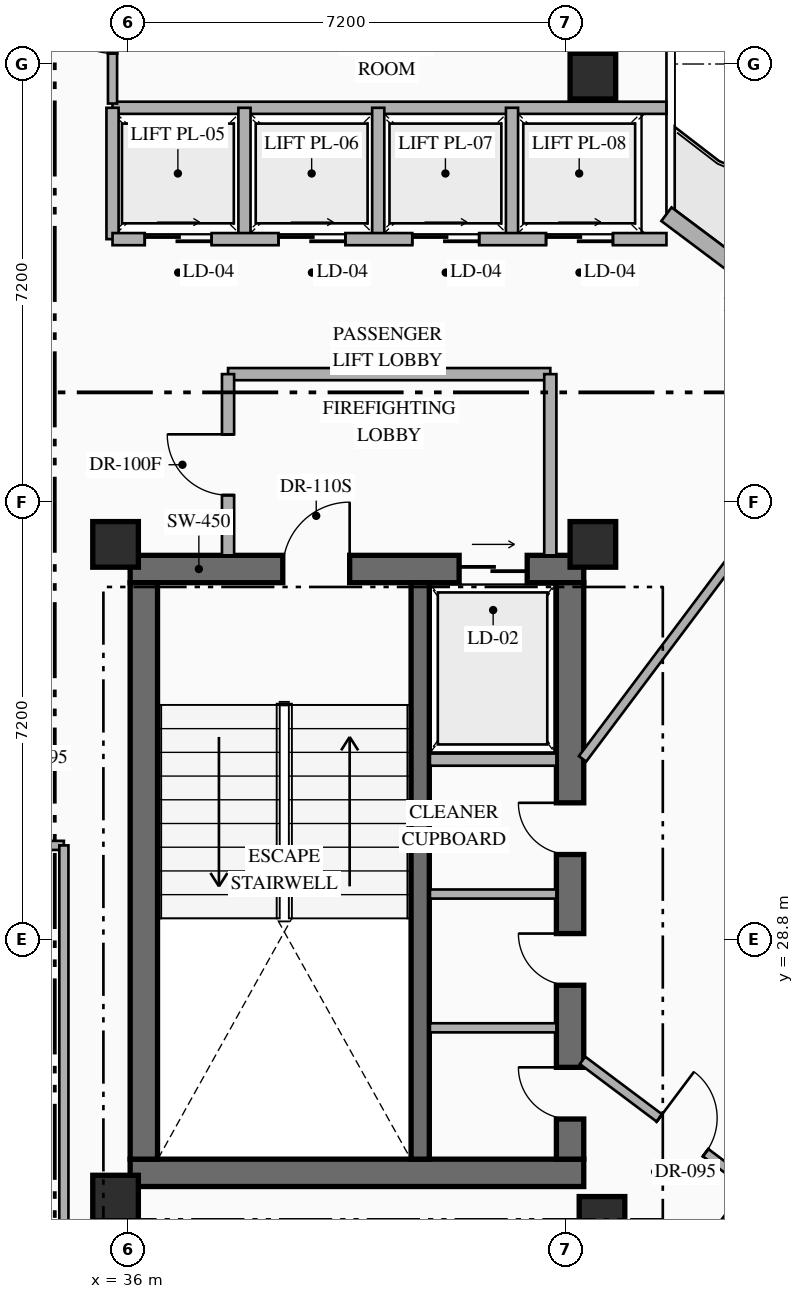
"""IFC4 building model, lengths in metres.
Left out: names, types, materials, properties, quantities, classifications, styles, units other than length and angle.
Written with IfcOpenShell. Run it as: python <this file> out.ifc"""

import sys

from ifc_helpers import new_model, si_unit, direction, frame, frame_2d, origin, origin_2d, place, context, subcontext, project, spatial, rectangle, hollow_rectangle, extrude, element, fill, save


model = new_model("IFC4")
c1 = context("Model", 3, precision=1e-05, world=origin(), true_north=direction((0.0, 1.0)))
c2 = subcontext(c1, "Body", "Model", "MODEL_VIEW")
j1 = project(units=[si_unit("LENGTHUNIT", "METRE"), si_unit("PLANEANGLEUNIT", "RADIAN")], contexts=[c1])
p1 = place(None, origin())
s1 = spatial("IfcSite", under=j1, at=p1, CompositionType="ELEMENT")
p2 = place(p1, origin())
s2 = spatial("IfcBuilding", under=s1, at=p2, CompositionType="ELEMENT")
p3 = place(p2, frame((0.0, 0.0, 195.15)))
s3 = spatial("IfcBuildingStorey", under=s2, at=p3, CompositionType="ELEMENT", Elevation=195.15)
p4 = place(p3, frame((36.04, 24.965, 0.0), z_axis=(0.0, 0.0, 1.0), x_axis=(1.0, 0.0, 0.0)))
e1 = element("IfcWall", 1, at=p4, inside=s3, PredefinedType="SHEAR", context=c2, shape_type="SweptSolid", body=[
    extrude(rectangle(XDim=7.46, YDim=0.45, at=frame_2d((3.73, 0.0))), origin(), (0.0, 0.0, 1.0), 3.6),
])
p5 = place(p3, frame((36.04, 34.895, 0.0), z_axis=(0.0, 0.0, 1.0), x_axis=(1.0, 0.0, 0.0)))
e2 = element("IfcWall", 2, at=p5, inside=s3, PredefinedType="SHEAR", context=c2, shape_type="SweptSolid", body=[
    extrude(rectangle(XDim=7.46, YDim=0.45, at=frame_2d((3.73, 0.0))), origin(), (0.0, 0.0, 1.0), 3.6),
])
p6 = place(p5, frame((2.51, 0.0, 0.0)))
e3 = element("IfcOpeningElement", 3, at=p6, cuts=e2, PredefinedType="OPENING", context=c2, shape_type="SweptSolid", body=[
    extrude(rectangle(XDim=1.1, YDim=2.2, at=frame_2d((0.55, 1.1))), frame((0.0, 0.235, 0.0), z_axis=(0.0, -1.0, 0.0), x_axis=(1.0, 0.0, 0.0)), (0.0, 0.0, 1.0), 0.47),
])
p7 = place(p5, frame((5.41, 0.0, 0.0)))
e4 = element("IfcOpeningElement", 4, at=p7, cuts=e2, PredefinedType="OPENING", context=c2, shape_type="SweptSolid", body=[
    extrude(rectangle(XDim=1.12, YDim=2.15, at=frame_2d((0.56, 1.075))), frame((0.0, 0.235, 0.0), z_axis=(0.0, -1.0, 0.0), x_axis=(1.0, 0.0, 0.0)), (0.0, 0.0, 1.0), 0.47),
])
p8 = place(p3, frame((36.265, 25.19, 0.0), z_axis=(0.0, 0.0, 1.0), x_axis=(0.0, 1.0, 0.0)))
e5 = element("IfcWall", 5, at=p8, inside=s3, PredefinedType="SHEAR", context=c2, shape_type="SweptSolid", body=[
    extrude(rectangle(XDim=9.48, YDim=0.45, at=frame_2d((4.74, 0.0))), origin(), (0.0, 0.0, 1.0), 3.6),
])
p9 = place(p3, frame((43.275, 25.19, 0.0), z_axis=(0.0, 0.0, 1.0), x_axis=(0.0, 1.0, 0.0)))
e6 = element("IfcWall", 6, at=p9, inside=s3, PredefinedType="SHEAR", context=c2, shape_type="SweptSolid", body=[
    extrude(rectangle(XDim=9.48, YDim=0.45, at=frame_2d((4.74, 0.0))), origin(), (0.0, 0.0, 1.0), 3.6),
])
p10 = place(p9, frame((0.66, 0.0, 0.0)))
e7 = element("IfcOpeningElement", 7, at=p10, cuts=e6, PredefinedType="OPENING", context=c2, shape_type="SweptSolid", body=[
    extrude(rectangle(XDim=0.85, YDim=2.08, at=frame_2d((0.425, 1.04))), frame((0.0, 0.235, 0.0), z_axis=(0.0, -1.0, 0.0), x_axis=(1.0, 0.0, 0.0)), (0.0, 0.0, 1.0), 0.47),
])
p11 = place(p9, frame((2.86, 0.0, 0.0)))
e8 = element("IfcOpeningElement", 8, at=p11, cuts=e6, PredefinedType="OPENING", context=c2, shape_type="SweptSolid", body=[
    extrude(rectangle(XDim=0.85, YDim=2.08, at=frame_2d((0.425, 1.04))), frame((0.0, 0.235, 0.0), z_axis=(0.0, -1.0, 0.0), x_axis=(1.0, 0.0, 0.0)), (0.0, 0.0, 1.0), 0.47),
])
p12 = place(p9, frame((5.01, 0.0, 0.0)))
e9 = element("IfcOpeningElement", 9, at=p12, cuts=e6, PredefinedType="OPENING", context=c2, shape_type="SweptSolid", body=[
    extrude(rectangle(XDim=0.85, YDim=2.08, at=frame_2d((0.425, 1.04))), frame((0.0, 0.235, 0.0), z_axis=(0.0, -1.0, 0.0), x_axis=(1.0, 0.0, 0.0)), (0.0, 0.0, 1.0), 0.47),
])
p13 = place(p3, frame((40.81, 25.19, 0.0), z_axis=(0.0, 0.0, 1.0), x_axis=(0.0, 1.0, 0.0)))
e10 = element("IfcWall", 10, at=p13, inside=s3, PredefinedType="SHEAR", context=c2, shape_type="SweptSolid", body=[
    extrude(rectangle(XDim=9.48, YDim=0.3, at=frame_2d((4.74, 0.0))), origin(), (0.0, 0.0, 1.0), 3.6),
])
for number, where, z_axis, x_axis in (
    (11, (35.8, 24.55, 0.0), (0.0, 0.0, 1.0), (1.0, 0.0, 0.0)),
    (12, (43.8, 24.2, 0.0), (0.0, 0.0, 1.0), (1.0, 0.0, 0.0)),
    (13, (35.8, 35.3, 0.0), (0.0, 0.0, 1.0), (1.0, 0.0, 0.0)),
    (14, (43.65, 35.3, 0.0), (0.0, 0.0, 1.0), (1.0, 0.0, 0.0)),
    (15, (43.65, 43.0, 0.0), (0.0, 0.0, 1.0), (1.0, 0.0, 0.0)),
):
    element("IfcColumn", number, at=place(p3, frame(where, z_axis=z_axis, x_axis=x_axis)), inside=s3, PredefinedType="COLUMN", context=c2, shape_type="SweptSolid", body=[
        extrude(hollow_rectangle(XDim=0.75, YDim=0.75, WallThickness=0.028, at=origin_2d()), origin(), (0.0, 0.0, 1.0), 3.6),
    ])
p14 = place(p3, frame((44.86, 40.73, 0.0), z_axis=(0.0, 0.0, 1.0), x_axis=(0.800007624502, -0.599989833863, 0.0)))
e16 = element("IfcWall", 16, at=p14, inside=s3, PredefinedType="STANDARD", context=c2, shape_type="SweptSolid", body=[
    extrude(rectangle(XDim=19.212, YDim=0.28, at=frame_2d((9.606, 0.0))), origin(), (0.0, 0.0, 1.0), 3.35),
])
p15 = place(p14, frame((1.755, 0.0, 0.0)))
e17 = element("IfcOpeningElement", 17, at=p15, cuts=e16, PredefinedType="OPENING", context=c2, shape_type="SweptSolid", body=[
    extrude(rectangle(XDim=1.1, YDim=2.2, at=frame_2d((0.55, 1.1))), frame((0.0, 0.15, 0.0), z_axis=(0.0, -1.0, 0.0), x_axis=(1.0, 0.0, 0.0)), (0.0, 0.0, 1.0), 0.3),
])
p16 = place(p14, frame((13.509, 0.0, 0.85)))
e18 = element("IfcOpeningElement", 18, at=p16, cuts=e16, PredefinedType="OPENING", context=c2, shape_type="SweptSolid", body=[
    extrude(rectangle(XDim=1.8, YDim=2.1, at=frame_2d((0.9, 1.05))), frame((0.0, 0.15, 0.0), z_axis=(0.0, -1.0, 0.0), x_axis=(1.0, 0.0, 0.0)), (0.0, 0.0, 1.0), 0.3),
])
p17 = place(p3, frame((40.97, 31.76, 0.0), z_axis=(0.0, 0.0, 1.0), x_axis=(1.0, 0.0, 0.0)))
e19 = element("IfcWall", 19, at=p17, inside=s3, PredefinedType="STANDARD", context=c2, shape_type="SweptSolid", body=[
    extrude(rectangle(XDim=2.08, YDim=0.2, at=frame_2d((1.04, 0.0))), origin(), (0.0, 0.0, 1.0), 3.35),
])
for number, where, z_axis, x_axis in (
    (20, (40.97, 27.35, 0.0), (0.0, 0.0, 1.0), (1.0, 0.0, 0.0)),
    (21, (40.97, 29.55, 0.0), (0.0, 0.0, 1.0), (1.0, 0.0, 0.0)),
):
    element("IfcWall", number, at=place(p3, frame(where, z_axis=z_axis, x_axis=x_axis)), inside=s3, PredefinedType="PARTITIONING", context=c2, shape_type="SweptSolid", body=[
        extrude(rectangle(XDim=2.08, YDim=0.15, at=frame_2d((1.04, 0.0))), origin(), (0.0, 0.0, 1.0), 3.35),
    ])
p18 = place(p3, frame((37.65, 38.1, 0.0), z_axis=(0.0, 0.0, 1.0), x_axis=(1.0, 0.0, 0.0)))
e22 = element("IfcWall", 22, at=p18, inside=s3, PredefinedType="STANDARD", context=c2, shape_type="SweptSolid", body=[
    extrude(rectangle(XDim=5.3, YDim=0.2, at=frame_2d((2.65, 0.0))), origin(), (0.0, 0.0, 1.0), 3.35),
])
p19 = place(p3, frame((42.95, 35.12, 0.0), z_axis=(0.0, 0.0, 1.0), x_axis=(0.0, 1.0, 0.0)))
e23 = element("IfcWall", 23, at=p19, inside=s3, PredefinedType="STANDARD", context=c2, shape_type="SweptSolid", body=[
    extrude(rectangle(XDim=2.98, YDim=0.2, at=frame_2d((1.49, 0.0))), origin(), (0.0, 0.0, 1.0), 3.35),
])
p20 = place(p3, frame((37.65, 35.12, 0.0), z_axis=(0.0, 0.0, 1.0), x_axis=(0.0, 1.0, 0.0)))
e24 = element("IfcWall", 24, at=p20, inside=s3, PredefinedType="STANDARD", context=c2, shape_type="SweptSolid", body=[
    extrude(rectangle(XDim=2.98, YDim=0.2, at=frame_2d((1.49, 0.0))), origin(), (0.0, 0.0, 1.0), 3.35),
])
p21 = place(p20, frame((0.99, 0.0, 0.0)))
e25 = element("IfcOpeningElement", 25, at=p21, cuts=e24, PredefinedType="OPENING", context=c2, shape_type="SweptSolid", body=[
    extrude(rectangle(XDim=1.0, YDim=2.2, at=frame_2d((0.5, 1.1))), frame((0.0, 0.11, 0.0), z_axis=(0.0, -1.0, 0.0), x_axis=(1.0, 0.0, 0.0)), (0.0, 0.0, 1.0), 0.22),
])
p22 = place(p3, frame((35.75, 42.48, 0.0), z_axis=(0.0, 0.0, 1.0), x_axis=(1.0, 0.0, 0.0)))
e26 = element("IfcWall", 26, at=p22, inside=s3, PredefinedType="STANDARD", context=c2, shape_type="SweptSolid", body=[
    extrude(rectangle(XDim=9.11, YDim=0.2, at=frame_2d((4.555, 0.0))), origin(), (0.0, 0.0, 1.0), 3.35),
])
for number, where, z_axis, x_axis in (
    (27, (35.75, 40.32, 0.0), (0.0, 0.0, 1.0), (0.0, 1.0, 0.0)),
    (28, (37.92, 40.32, 0.0), (0.0, 0.0, 1.0), (0.0, 1.0, 0.0)),
    (29, (40.12, 40.32, 0.0), (0.0, 0.0, 1.0), (0.0, 1.0, 0.0)),
    (30, (42.32, 40.32, 0.0), (0.0, 0.0, 1.0), (0.0, 1.0, 0.0)),
):
    element("IfcWall", number, at=place(p3, frame(where, z_axis=z_axis, x_axis=x_axis)), inside=s3, PredefinedType="STANDARD", context=c2, shape_type="SweptSolid", body=[
        extrude(rectangle(XDim=2.16, YDim=0.2, at=frame_2d((1.08, 0.0))), origin(), (0.0, 0.0, 1.0), 3.35),
    ])
p23 = place(p3, frame((35.75, 40.32, 0.0), z_axis=(0.0, 0.0, 1.0), x_axis=(1.0, 0.0, 0.0)))
e31 = element("IfcWall", 31, at=p23, inside=s3, PredefinedType="STANDARD", context=c2, shape_type="SweptSolid", body=[
    extrude(rectangle(XDim=9.11, YDim=0.2, at=frame_2d((4.555, 0.0))), origin(), (0.0, 0.0, 1.0), 3.35),
])
p24 = place(p23, frame((0.53, 0.0, 0.0)))
e32 = element("IfcOpeningElement", 32, at=p24, cuts=e31, PredefinedType="OPENING", context=c2, shape_type="SweptSolid", body=[
    extrude(rectangle(XDim=1.1, YDim=2.18, at=frame_2d((0.55, 1.09))), frame((0.0, 0.11, 0.0), z_axis=(0.0, -1.0, 0.0), x_axis=(1.0, 0.0, 0.0)), (0.0, 0.0, 1.0), 0.22),
])
p25 = place(p23, frame((2.73, 0.0, 0.0)))
e33 = element("IfcOpeningElement", 33, at=p25, cuts=e31, PredefinedType="OPENING", context=c2, shape_type="SweptSolid", body=[
    extrude(rectangle(XDim=1.1, YDim=2.18, at=frame_2d((0.55, 1.09))), frame((0.0, 0.11, 0.0), z_axis=(0.0, -1.0, 0.0), x_axis=(1.0, 0.0, 0.0)), (0.0, 0.0, 1.0), 0.22),
])
p26 = place(p23, frame((4.93, 0.0, 0.0)))
e34 = element("IfcOpeningElement", 34, at=p26, cuts=e31, PredefinedType="OPENING", context=c2, shape_type="SweptSolid", body=[
    extrude(rectangle(XDim=1.1, YDim=2.18, at=frame_2d((0.55, 1.09))), frame((0.0, 0.11, 0.0), z_axis=(0.0, -1.0, 0.0), x_axis=(1.0, 0.0, 0.0)), (0.0, 0.0, 1.0), 0.22),
])
p27 = place(p23, frame((7.13, 0.0, 0.0)))
e35 = element("IfcOpeningElement", 35, at=p27, cuts=e31, PredefinedType="OPENING", context=c2, shape_type="SweptSolid", body=[
    extrude(rectangle(XDim=1.1, YDim=2.18, at=frame_2d((0.55, 1.09))), frame((0.0, 0.11, 0.0), z_axis=(0.0, -1.0, 0.0), x_axis=(1.0, 0.0, 0.0)), (0.0, 0.0, 1.0), 0.22),
])
p28 = place(p3, frame((30.5, 30.35, 0.0), z_axis=(0.0, 0.0, 1.0), x_axis=(1.0, 0.0, 0.0)))
e36 = element("IfcWall", 36, at=p28, inside=s3, PredefinedType="PARTITIONING", context=c2, shape_type="SweptSolid", body=[
    extrude(rectangle(XDim=4.45, YDim=0.15, at=frame_2d((2.225, 0.0))), origin(), (0.0, 0.0, 1.0), 3.35),
])
p29 = place(p28, frame((2.846, 0.0, 0.0)))
e37 = element("IfcOpeningElement", 37, at=p29, cuts=e36, PredefinedType="OPENING", context=c2, shape_type="SweptSolid", body=[
    extrude(rectangle(XDim=0.95, YDim=2.15, at=frame_2d((0.475, 1.075))), frame((0.0, 0.085, 0.0), z_axis=(0.0, -1.0, 0.0), x_axis=(1.0, 0.0, 0.0)), (0.0, 0.0, 1.0), 0.17),
])
p30 = place(p3, frame((34.95, 23.2, 0.0), z_axis=(0.0, 0.0, 1.0), x_axis=(0.0, 1.0, 0.0)))
e38 = element("IfcWall", 38, at=p30, inside=s3, PredefinedType="PARTITIONING", context=c2, shape_type="SweptSolid", body=[
    extrude(rectangle(XDim=7.15, YDim=0.15, at=frame_2d((3.575, 0.0))), origin(), (0.0, 0.0, 1.0), 3.35),
])
p31 = place(p3, frame((43.68, 21.29, 0.0), z_axis=(0.0, 0.0, 1.0), x_axis=(0.600018601461, 0.799986048566, 0.0)))
e39 = element("IfcWall", 39, at=p31, inside=s3, PredefinedType="PARTITIONING", context=c2, shape_type="SweptSolid", body=[
    extrude(rectangle(XDim=4.2, YDim=0.15, at=frame_2d((2.1, 0.0))), origin(), (0.0, 0.0, 1.0), 3.35),
])
p32 = place(p31, frame((0.754, 0.0, 0.0)))
e40 = element("IfcOpeningElement", 40, at=p32, cuts=e39, PredefinedType="OPENING", context=c2, shape_type="SweptSolid", body=[
    extrude(rectangle(XDim=0.95, YDim=2.15, at=frame_2d((0.475, 1.075))), frame((0.0, 0.085, 0.0), z_axis=(0.0, -1.0, 0.0), x_axis=(1.0, 0.0, 0.0)), (0.0, 0.0, 1.0), 0.17),
])
p33 = place(p3, frame((43.48, 26.815, 0.0), z_axis=(0.0, 0.0, 1.0), x_axis=(0.800008430676, -0.599988758934, 0.0)))
e41 = element("IfcWall", 41, at=p33, inside=s3, PredefinedType="PARTITIONING", context=c2, shape_type="SweptSolid", body=[
    extrude(rectangle(XDim=3.475, YDim=0.15, at=frame_2d((1.738, 0.0))), origin(), (0.0, 0.0, 1.0), 3.35),
])
p34 = place(p33, frame((1.58, 0.0, 0.0)))
e42 = element("IfcOpeningElement", 42, at=p34, cuts=e41, PredefinedType="OPENING", context=c2, shape_type="SweptSolid", body=[
    extrude(rectangle(XDim=0.95, YDim=2.15, at=frame_2d((0.475, 1.075))), frame((0.0, 0.085, 0.0), z_axis=(0.0, -1.0, 0.0), x_axis=(1.0, 0.0, 0.0)), (0.0, 0.0, 1.0), 0.17),
])
p35 = place(p3, frame((43.48, 31.773, 0.0), z_axis=(0.0, 0.0, 1.0), x_axis=(0.599971041729, 0.800021717885, 0.0)))
e43 = element("IfcWall", 43, at=p35, inside=s3, PredefinedType="PARTITIONING", context=c2, shape_type="SweptSolid", body=[
    extrude(rectangle(XDim=8.094, YDim=0.15, at=frame_2d((4.047, 0.0))), origin(), (0.0, 0.0, 1.0), 3.35),
])
p36 = place(p3, frame((35.75, 42.55, 0.0), z_axis=(0.0, 0.0, 1.0), x_axis=(0.0, 1.0, 0.0)))
e44 = element("IfcWall", 44, at=p36, inside=s3, PredefinedType="PARTITIONING", context=c2, shape_type="SweptSolid", body=[
    extrude(rectangle(XDim=2.6, YDim=0.15, at=frame_2d((1.3, 0.0))), origin(), (0.0, 0.0, 1.0), 3.35),
])
p37 = place(p36, frame((0.825, 0.0, 0.0)))
e45 = element("IfcOpeningElement", 45, at=p37, cuts=e44, PredefinedType="OPENING", context=c2, shape_type="SweptSolid", body=[
    extrude(rectangle(XDim=0.95, YDim=2.15, at=frame_2d((0.475, 1.075))), frame((0.0, 0.085, 0.0), z_axis=(0.0, -1.0, 0.0), x_axis=(1.0, 0.0, 0.0)), (0.0, 0.0, 1.0), 0.17),
])
p38 = place(p3, frame((27.91, 26.68, 0.0), z_axis=(0.0, 0.0, 1.0), x_axis=(0.800005938517, -0.599992081896, 0.0)))
e46 = element("IfcWall", 46, at=p38, inside=s3, PredefinedType="PARTITIONING", context=c2, shape_type="SweptSolid", body=[
    extrude(rectangle(XDim=14.8, YDim=0.15, at=frame_2d((7.4, 0.0))), origin(), (0.0, 0.0, 1.0), 3.35),
])
p39 = place(p38, frame((9.281, 0.0, 0.0)))
e47 = element("IfcOpeningElement", 47, at=p39, cuts=e46, PredefinedType="OPENING", context=c2, shape_type="SweptSolid", body=[
    extrude(rectangle(XDim=0.95, YDim=2.15, at=frame_2d((0.475, 1.075))), frame((0.0, 0.085, 0.0), z_axis=(0.0, -1.0, 0.0), x_axis=(1.0, 0.0, 0.0)), (0.0, 0.0, 1.0), 0.17),
])
p40 = place(p6, origin())
e48 = element("IfcDoor", 48, at=p40, inside=s3, OperationType="SINGLE_SWING_RIGHT", PredefinedType="DOOR", context=c2, shape_type="SweptSolid", body=[
    extrude(rectangle(XDim=1.1, YDim=2.2, at=frame_2d((0.55, 1.1))), frame((0.0, 0.025, 0.0), z_axis=(0.0, -1.0, 0.0), x_axis=(1.0, 0.0, 0.0)), (0.0, 0.0, 1.0), 0.05),
])
fill(e3, e48)
p41 = place(p7, origin())
e49 = element("IfcDoor", 49, at=p41, inside=s3, OperationType="SLIDING_TO_RIGHT", PredefinedType="USERDEFINED", context=c2, shape_type="SweptSolid", body=[
    extrude(rectangle(XDim=1.12, YDim=2.15, at=frame_2d((0.56, 1.075))), frame((0.0, 0.025, 0.0), z_axis=(0.0, -1.0, 0.0), x_axis=(1.0, 0.0, 0.0)), (0.0, 0.0, 1.0), 0.05),
])
fill(e4, e49)
p42 = place(p10, origin())
e50 = element("IfcDoor", 50, at=p42, inside=s3, OperationType="SINGLE_SWING_RIGHT", PredefinedType="DOOR", context=c2, shape_type="SweptSolid", body=[
    extrude(rectangle(XDim=0.85, YDim=2.08, at=frame_2d((0.425, 1.04))), frame((0.0, 0.025, 0.0), z_axis=(0.0, -1.0, 0.0), x_axis=(1.0, 0.0, 0.0)), (0.0, 0.0, 1.0), 0.05),
])
fill(e7, e50)
p43 = place(p11, origin())
e51 = element("IfcDoor", 51, at=p43, inside=s3, OperationType="SINGLE_SWING_RIGHT", PredefinedType="DOOR", context=c2, shape_type="SweptSolid", body=[
    extrude(rectangle(XDim=0.85, YDim=2.08, at=frame_2d((0.425, 1.04))), frame((0.0, 0.025, 0.0), z_axis=(0.0, -1.0, 0.0), x_axis=(1.0, 0.0, 0.0)), (0.0, 0.0, 1.0), 0.05),
])
fill(e8, e51)
p44 = place(p12, origin())
e52 = element("IfcDoor", 52, at=p44, inside=s3, OperationType="SINGLE_SWING_RIGHT", PredefinedType="DOOR", context=c2, shape_type="SweptSolid", body=[
    extrude(rectangle(XDim=0.85, YDim=2.08, at=frame_2d((0.425, 1.04))), frame((0.0, 0.025, 0.0), z_axis=(0.0, -1.0, 0.0), x_axis=(1.0, 0.0, 0.0)), (0.0, 0.0, 1.0), 0.05),
])
fill(e9, e52)
p45 = place(p21, origin())
e53 = element("IfcDoor", 53, at=p45, inside=s3, OperationType="SINGLE_SWING_RIGHT", PredefinedType="DOOR", context=c2, shape_type="SweptSolid", body=[
    extrude(rectangle(XDim=1.0, YDim=2.2, at=frame_2d((0.5, 1.1))), frame((0.0, 0.025, 0.0), z_axis=(0.0, -1.0, 0.0), x_axis=(1.0, 0.0, 0.0)), (0.0, 0.0, 1.0), 0.05),
])
fill(e25, e53)
p46 = place(p24, origin())
e54 = element("IfcDoor", 54, at=p46, inside=s3, OperationType="SLIDING_TO_RIGHT", PredefinedType="USERDEFINED", context=c2, shape_type="SweptSolid", body=[
    extrude(rectangle(XDim=1.1, YDim=2.18, at=frame_2d((0.55, 1.09))), frame((0.0, 0.025, 0.0), z_axis=(0.0, -1.0, 0.0), x_axis=(1.0, 0.0, 0.0)), (0.0, 0.0, 1.0), 0.05),
])
fill(e32, e54)
p47 = place(p25, origin())
e55 = element("IfcDoor", 55, at=p47, inside=s3, OperationType="SLIDING_TO_RIGHT", PredefinedType="USERDEFINED", context=c2, shape_type="SweptSolid", body=[
    extrude(rectangle(XDim=1.1, YDim=2.18, at=frame_2d((0.55, 1.09))), frame((0.0, 0.025, 0.0), z_axis=(0.0, -1.0, 0.0), x_axis=(1.0, 0.0, 0.0)), (0.0, 0.0, 1.0), 0.05),
])
fill(e33, e55)
p48 = place(p26, origin())
e56 = element("IfcDoor", 56, at=p48, inside=s3, OperationType="SLIDING_TO_RIGHT", PredefinedType="USERDEFINED", context=c2, shape_type="SweptSolid", body=[
    extrude(rectangle(XDim=1.1, YDim=2.18, at=frame_2d((0.55, 1.09))), frame((0.0, 0.025, 0.0), z_axis=(0.0, -1.0, 0.0), x_axis=(1.0, 0.0, 0.0)), (0.0, 0.0, 1.0), 0.05),
])
fill(e34, e56)
p49 = place(p27, origin())
e57 = element("IfcDoor", 57, at=p49, inside=s3, OperationType="SLIDING_TO_RIGHT", PredefinedType="USERDEFINED", context=c2, shape_type="SweptSolid", body=[
    extrude(rectangle(XDim=1.1, YDim=2.18, at=frame_2d((0.55, 1.09))), frame((0.0, 0.025, 0.0), z_axis=(0.0, -1.0, 0.0), x_axis=(1.0, 0.0, 0.0)), (0.0, 0.0, 1.0), 0.05),
])
fill(e35, e57)
p50 = place(p34, origin())
e58 = element("IfcDoor", 58, at=p50, inside=s3, OperationType="SINGLE_SWING_LEFT", PredefinedType="DOOR", context=c2, shape_type="SweptSolid", body=[
    extrude(rectangle(XDim=0.95, YDim=2.15, at=frame_2d((0.475, 1.075))), frame((0.0, 0.025, 0.0), z_axis=(0.0, -1.0, 0.0), x_axis=(1.0, 0.0, 0.0)), (0.0, 0.0, 1.0), 0.05),
])
fill(e42, e58)
p51 = place(p37, origin())
e59 = element("IfcDoor", 59, at=p51, inside=s3, OperationType="SINGLE_SWING_RIGHT", PredefinedType="DOOR", context=c2, shape_type="SweptSolid", body=[
    extrude(rectangle(XDim=0.95, YDim=2.15, at=frame_2d((0.475, 1.075))), frame((0.0, 0.025, 0.0), z_axis=(0.0, -1.0, 0.0), x_axis=(1.0, 0.0, 0.0)), (0.0, 0.0, 1.0), 0.05),
])
fill(e45, e59)
save(model, sys.argv[1])
